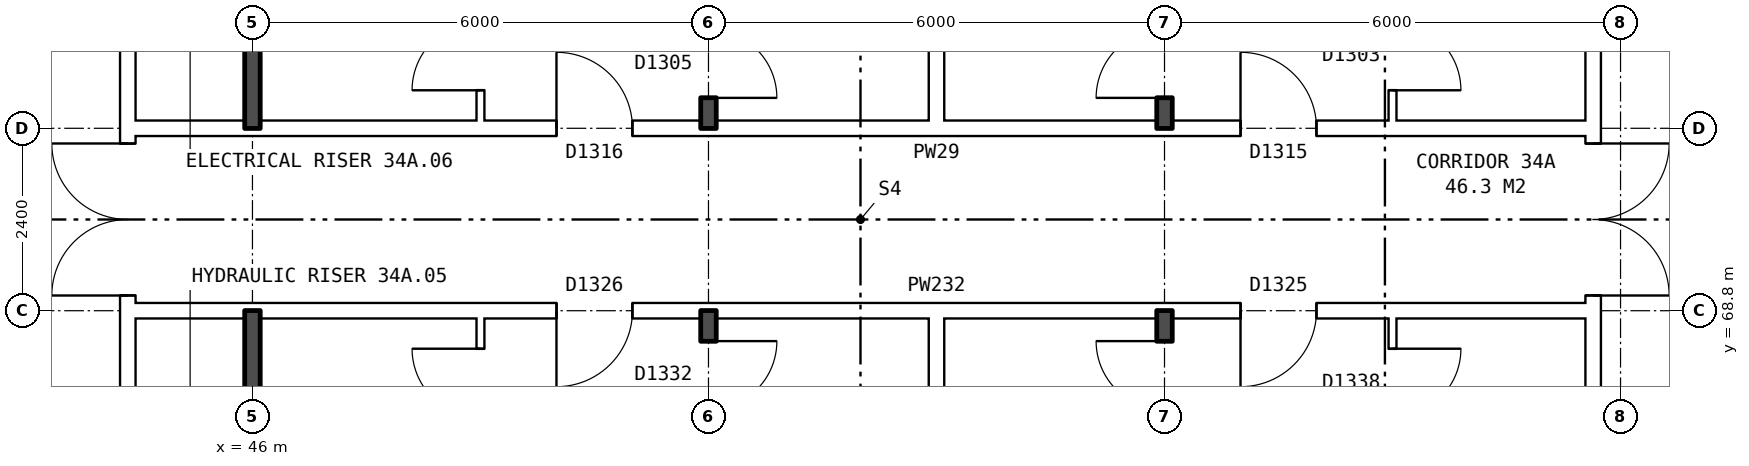
"""IFC4 building model, lengths in metres.
Left out: names, types, materials, properties, quantities, classifications, styles, units other than length and angle.
Written with IfcOpenShell. Run it as: python <this file> out.ifc"""

import sys

from ifc_helpers import new_model, si_unit, direction, frame, frame_2d, origin, place, context, subcontext, project, spatial, rectangle, extrude, element, fill, save


model = new_model("IFC4")
c1 = context("Model", 3, precision=1e-05, world=origin(), true_north=direction((0.0, 1.0)))
c2 = subcontext(c1, "Body", "Model", "MODEL_VIEW")
j1 = project(units=[si_unit("LENGTHUNIT", "METRE"), si_unit("PLANEANGLEUNIT", "RADIAN")], contexts=[c1])
p1 = place(None, origin())
s1 = spatial("IfcSite", under=j1, at=p1, CompositionType="ELEMENT")
p2 = place(p1, origin())
s2 = spatial("IfcBuilding", under=s1, at=p2, CompositionType="ELEMENT")
p3 = place(p2, frame((0.0, 0.0, 123.7)))
s3 = spatial("IfcBuildingStorey", under=s2, at=p3, CompositionType="ELEMENT", Elevation=123.7)
p4 = place(p3, frame((63.64, 63.9, 0.0), z_axis=(0.0, 0.0, 1.0), x_axis=(0.0, 1.0, 0.0)))
e1 = element("IfcWall", 1, at=p4, inside=s3, PredefinedType="PARTITIONING", context=c2, shape_type="SweptSolid", body=[
    extrude(rectangle(XDim=12.2, YDim=0.2, at=frame_2d((6.1, 0.0))), origin(), (0.0, 0.0, 1.0), 2.85),
])
p5 = place(p4, frame((5.1, 0.0, 0.0)))
e2 = element("IfcOpeningElement", 2, at=p5, cuts=e1, PredefinedType="OPENING", context=c2, shape_type="SweptSolid", body=[
    extrude(rectangle(XDim=2.0, YDim=2.1, at=frame_2d((1.0, 1.05))), frame((0.0, 0.11, 0.0), z_axis=(0.0, -1.0, 0.0), x_axis=(1.0, 0.0, 0.0)), (0.0, 0.0, 1.0), 0.22),
])
p6 = place(p3, frame((44.36, 63.9, 0.0), z_axis=(0.0, 0.0, 1.0), x_axis=(0.0, 1.0, 0.0)))
e3 = element("IfcWall", 3, at=p6, inside=s3, PredefinedType="PARTITIONING", context=c2, shape_type="SweptSolid", body=[
    extrude(rectangle(XDim=12.2, YDim=0.2, at=frame_2d((6.1, 0.0))), origin(), (0.0, 0.0, 1.0), 2.85),
])
p7 = place(p6, frame((5.1, 0.0, 0.0)))
e4 = element("IfcOpeningElement", 4, at=p7, cuts=e3, PredefinedType="OPENING", context=c2, shape_type="SweptSolid", body=[
    extrude(rectangle(XDim=2.0, YDim=2.1, at=frame_2d((1.0, 1.05))), frame((0.0, 0.11, 0.0), z_axis=(0.0, -1.0, 0.0), x_axis=(1.0, 0.0, 0.0)), (0.0, 0.0, 1.0), 0.22),
])
p8 = place(p3, frame((44.36, 68.8, 0.0), z_axis=(0.0, 0.0, 1.0), x_axis=(1.0, 0.0, 0.0)))
e5 = element("IfcWall", 5, at=p8, inside=s3, PredefinedType="PARTITIONING", context=c2, shape_type="SweptSolid", body=[
    extrude(rectangle(XDim=19.28, YDim=0.2, at=frame_2d((9.64, 0.0))), origin(), (0.0, 0.0, 1.0), 2.85),
])
p9 = place(p8, frame((14.64, 0.0, 0.0)))
e6 = element("IfcOpeningElement", 6, at=p9, cuts=e5, PredefinedType="OPENING", context=c2, shape_type="SweptSolid", body=[
    extrude(rectangle(XDim=1.0, YDim=2.1, at=frame_2d((0.5, 1.05))), frame((0.0, 0.11, 0.0), z_axis=(0.0, -1.0, 0.0), x_axis=(1.0, 0.0, 0.0)), (0.0, 0.0, 1.0), 0.22),
])
p10 = place(p8, frame((5.64, 0.0, 0.0)))
e7 = element("IfcOpeningElement", 7, at=p10, cuts=e5, PredefinedType="OPENING", context=c2, shape_type="SweptSolid", body=[
    extrude(rectangle(XDim=1.0, YDim=2.1, at=frame_2d((0.5, 1.05))), frame((0.0, 0.11, 0.0), z_axis=(0.0, -1.0, 0.0), x_axis=(1.0, 0.0, 0.0)), (0.0, 0.0, 1.0), 0.22),
])
p11 = place(p3, frame((44.36, 71.2, 0.0), z_axis=(0.0, 0.0, 1.0), x_axis=(1.0, 0.0, 0.0)))
e8 = element("IfcWall", 8, at=p11, inside=s3, PredefinedType="PARTITIONING", context=c2, shape_type="SweptSolid", body=[
    extrude(rectangle(XDim=19.28, YDim=0.2, at=frame_2d((9.64, 0.0))), origin(), (0.0, 0.0, 1.0), 2.85),
])
p12 = place(p11, frame((14.64, 0.0, 0.0)))
e9 = element("IfcOpeningElement", 9, at=p12, cuts=e8, PredefinedType="OPENING", context=c2, shape_type="SweptSolid", body=[
    extrude(rectangle(XDim=1.0, YDim=2.1, at=frame_2d((0.5, 1.05))), frame((0.0, 0.11, 0.0), z_axis=(0.0, -1.0, 0.0), x_axis=(1.0, 0.0, 0.0)), (0.0, 0.0, 1.0), 0.22),
])
p13 = place(p11, frame((5.64, 0.0, 0.0)))
e10 = element("IfcOpeningElement", 10, at=p13, cuts=e8, PredefinedType="OPENING", context=c2, shape_type="SweptSolid", body=[
    extrude(rectangle(XDim=1.0, YDim=2.1, at=frame_2d((0.5, 1.05))), frame((0.0, 0.11, 0.0), z_axis=(0.0, -1.0, 0.0), x_axis=(1.0, 0.0, 0.0)), (0.0, 0.0, 1.0), 0.22),
])
for number, where, z_axis, x_axis in (
    (11, (46.0, 63.8, 0.0), (0.0, 0.0, 1.0), (0.0, 1.0, 0.0)),
    (12, (46.0, 71.2, 0.0), (0.0, 0.0, 1.0), (0.0, 1.0, 0.0)),
):
    element("IfcWall", number, at=place(p3, frame(where, z_axis=z_axis, x_axis=x_axis)), inside=s3, PredefinedType="SOLIDWALL", context=c2, shape_type="SweptSolid", body=[
        extrude(rectangle(XDim=5.0, YDim=0.2, at=frame_2d((2.5, 0.0))), origin(), (0.0, 0.0, 1.0), 2.85),
    ])
p14 = place(p3, frame((49.0, 54.36, 0.0), z_axis=(0.0, 0.0, 1.0), x_axis=(0.0, 1.0, 0.0)))
e13 = element("IfcWall", 13, at=p14, inside=s3, PredefinedType="PARTITIONING", context=c2, shape_type="SweptSolid", body=[
    extrude(rectangle(XDim=14.34, YDim=0.1, at=frame_2d((7.17, 0.0))), origin(), (0.0, 0.0, 1.0), 2.85),
])
p15 = place(p14, frame((6.7, 0.0, 0.0)))
e14 = element("IfcOpeningElement", 14, at=p15, cuts=e13, PredefinedType="OPENING", context=c2, shape_type="SweptSolid", body=[
    extrude(rectangle(XDim=0.9, YDim=2.1, at=frame_2d((0.45, 1.05))), frame((0.0, 0.06, 0.0), z_axis=(0.0, -1.0, 0.0), x_axis=(1.0, 0.0, 0.0)), (0.0, 0.0, 1.0), 0.12),
])
p16 = place(p14, frame((13.04, 0.0, 0.0)))
e15 = element("IfcOpeningElement", 15, at=p16, cuts=e13, PredefinedType="OPENING", context=c2, shape_type="SweptSolid", body=[
    extrude(rectangle(XDim=0.9, YDim=2.1, at=frame_2d((0.45, 1.05))), frame((0.0, 0.06, 0.0), z_axis=(0.0, -1.0, 0.0), x_axis=(1.0, 0.0, 0.0)), (0.0, 0.0, 1.0), 0.12),
])
p17 = place(p3, frame((49.0, 71.3, 0.0), z_axis=(0.0, 0.0, 1.0), x_axis=(0.0, 1.0, 0.0)))
e16 = element("IfcWall", 16, at=p17, inside=s3, PredefinedType="PARTITIONING", context=c2, shape_type="SweptSolid", body=[
    extrude(rectangle(XDim=14.34, YDim=0.1, at=frame_2d((7.17, 0.0))), origin(), (0.0, 0.0, 1.0), 2.85),
])
p18 = place(p17, frame((6.74, 0.0, 0.0)))
e17 = element("IfcOpeningElement", 17, at=p18, cuts=e16, PredefinedType="OPENING", context=c2, shape_type="SweptSolid", body=[
    extrude(rectangle(XDim=0.9, YDim=2.1, at=frame_2d((0.45, 1.05))), frame((0.0, 0.06, 0.0), z_axis=(0.0, -1.0, 0.0), x_axis=(1.0, 0.0, 0.0)), (0.0, 0.0, 1.0), 0.12),
])
p19 = place(p17, frame((0.4, 0.0, 0.0)))
e18 = element("IfcOpeningElement", 18, at=p19, cuts=e16, PredefinedType="OPENING", context=c2, shape_type="SweptSolid", body=[
    extrude(rectangle(XDim=0.9, YDim=2.1, at=frame_2d((0.45, 1.05))), frame((0.0, 0.06, 0.0), z_axis=(0.0, -1.0, 0.0), x_axis=(1.0, 0.0, 0.0)), (0.0, 0.0, 1.0), 0.12),
])
p20 = place(p3, frame((52.0, 54.36, 0.0), z_axis=(0.0, 0.0, 1.0), x_axis=(0.0, 1.0, 0.0)))
e19 = element("IfcWall", 19, at=p20, inside=s3, PredefinedType="SOLIDWALL", context=c2, shape_type="SweptSolid", body=[
    extrude(rectangle(XDim=14.44, YDim=0.2, at=frame_2d((7.22, 0.0))), origin(), (0.0, 0.0, 1.0), 2.85),
])
p21 = place(p20, frame((6.7, 0.0, 0.0)))
e20 = element("IfcOpeningElement", 20, at=p21, cuts=e19, PredefinedType="OPENING", context=c2, shape_type="SweptSolid", body=[
    extrude(rectangle(XDim=0.9, YDim=2.1, at=frame_2d((0.45, 1.05))), frame((0.0, 0.11, 0.0), z_axis=(0.0, -1.0, 0.0), x_axis=(1.0, 0.0, 0.0)), (0.0, 0.0, 1.0), 0.22),
])
p22 = place(p20, frame((13.14, 0.0, 0.0)))
e21 = element("IfcOpeningElement", 21, at=p22, cuts=e19, PredefinedType="OPENING", context=c2, shape_type="SweptSolid", body=[
    extrude(rectangle(XDim=0.9, YDim=2.1, at=frame_2d((0.45, 1.05))), frame((0.0, 0.11, 0.0), z_axis=(0.0, -1.0, 0.0), x_axis=(1.0, 0.0, 0.0)), (0.0, 0.0, 1.0), 0.22),
])
p23 = place(p3, frame((52.0, 71.2, 0.0), z_axis=(0.0, 0.0, 1.0), x_axis=(0.0, 1.0, 0.0)))
e22 = element("IfcWall", 22, at=p23, inside=s3, PredefinedType="SOLIDWALL", context=c2, shape_type="SweptSolid", body=[
    extrude(rectangle(XDim=14.44, YDim=0.2, at=frame_2d((7.22, 0.0))), origin(), (0.0, 0.0, 1.0), 2.85),
])
p24 = place(p23, frame((6.84, 0.0, 0.0)))
e23 = element("IfcOpeningElement", 23, at=p24, cuts=e22, PredefinedType="OPENING", context=c2, shape_type="SweptSolid", body=[
    extrude(rectangle(XDim=0.9, YDim=2.1, at=frame_2d((0.45, 1.05))), frame((0.0, 0.11, 0.0), z_axis=(0.0, -1.0, 0.0), x_axis=(1.0, 0.0, 0.0)), (0.0, 0.0, 1.0), 0.22),
])
p25 = place(p23, frame((0.4, 0.0, 0.0)))
e24 = element("IfcOpeningElement", 24, at=p25, cuts=e22, PredefinedType="OPENING", context=c2, shape_type="SweptSolid", body=[
    extrude(rectangle(XDim=0.9, YDim=2.1, at=frame_2d((0.45, 1.05))), frame((0.0, 0.11, 0.0), z_axis=(0.0, -1.0, 0.0), x_axis=(1.0, 0.0, 0.0)), (0.0, 0.0, 1.0), 0.22),
])
for number, where, z_axis, x_axis in (
    (25, (55.0, 54.36, 0.0), (0.0, 0.0, 1.0), (0.0, 1.0, 0.0)),
    (26, (55.0, 71.3, 0.0), (0.0, 0.0, 1.0), (0.0, 1.0, 0.0)),
):
    element("IfcWall", number, at=place(p3, frame(where, z_axis=z_axis, x_axis=x_axis)), inside=s3, PredefinedType="PARTITIONING", context=c2, shape_type="SweptSolid", body=[
        extrude(rectangle(XDim=14.34, YDim=0.2, at=frame_2d((7.17, 0.0))), origin(), (0.0, 0.0, 1.0), 2.85),
    ])
p26 = place(p3, frame((58.0, 54.36, 0.0), z_axis=(0.0, 0.0, 1.0), x_axis=(0.0, 1.0, 0.0)))
e27 = element("IfcWall", 27, at=p26, inside=s3, PredefinedType="SOLIDWALL", context=c2, shape_type="SweptSolid", body=[
    extrude(rectangle(XDim=14.44, YDim=0.2, at=frame_2d((7.22, 0.0))), origin(), (0.0, 0.0, 1.0), 2.85),
])
p27 = place(p26, frame((4.2, 0.0, 0.0)))
e28 = element("IfcOpeningElement", 28, at=p27, cuts=e27, PredefinedType="OPENING", context=c2, shape_type="SweptSolid", body=[
    extrude(rectangle(XDim=0.9, YDim=2.1, at=frame_2d((0.45, 1.05))), frame((0.0, 0.11, 0.0), z_axis=(0.0, -1.0, 0.0), x_axis=(1.0, 0.0, 0.0)), (0.0, 0.0, 1.0), 0.22),
])
p28 = place(p26, frame((13.14, 0.0, 0.0)))
e29 = element("IfcOpeningElement", 29, at=p28, cuts=e27, PredefinedType="OPENING", context=c2, shape_type="SweptSolid", body=[
    extrude(rectangle(XDim=0.9, YDim=2.1, at=frame_2d((0.45, 1.05))), frame((0.0, 0.11, 0.0), z_axis=(0.0, -1.0, 0.0), x_axis=(1.0, 0.0, 0.0)), (0.0, 0.0, 1.0), 0.22),
])
p29 = place(p3, frame((58.0, 71.2, 0.0), z_axis=(0.0, 0.0, 1.0), x_axis=(0.0, 1.0, 0.0)))
e30 = element("IfcWall", 30, at=p29, inside=s3, PredefinedType="SOLIDWALL", context=c2, shape_type="SweptSolid", body=[
    extrude(rectangle(XDim=14.44, YDim=0.2, at=frame_2d((7.22, 0.0))), origin(), (0.0, 0.0, 1.0), 2.85),
])
p30 = place(p29, frame((9.34, 0.0, 0.0)))
e31 = element("IfcOpeningElement", 31, at=p30, cuts=e30, PredefinedType="OPENING", context=c2, shape_type="SweptSolid", body=[
    extrude(rectangle(XDim=0.9, YDim=2.1, at=frame_2d((0.45, 1.05))), frame((0.0, 0.11, 0.0), z_axis=(0.0, -1.0, 0.0), x_axis=(1.0, 0.0, 0.0)), (0.0, 0.0, 1.0), 0.22),
])
p31 = place(p29, frame((0.4, 0.0, 0.0)))
e32 = element("IfcOpeningElement", 32, at=p31, cuts=e30, PredefinedType="OPENING", context=c2, shape_type="SweptSolid", body=[
    extrude(rectangle(XDim=0.9, YDim=2.1, at=frame_2d((0.45, 1.05))), frame((0.0, 0.11, 0.0), z_axis=(0.0, -1.0, 0.0), x_axis=(1.0, 0.0, 0.0)), (0.0, 0.0, 1.0), 0.22),
])
p32 = place(p3, frame((61.0, 54.36, 0.0), z_axis=(0.0, 0.0, 1.0), x_axis=(0.0, 1.0, 0.0)))
e33 = element("IfcWall", 33, at=p32, inside=s3, PredefinedType="PARTITIONING", context=c2, shape_type="SweptSolid", body=[
    extrude(rectangle(XDim=14.34, YDim=0.1, at=frame_2d((7.17, 0.0))), origin(), (0.0, 0.0, 1.0), 2.85),
])
p33 = place(p32, frame((4.2, 0.0, 0.0)))
e34 = element("IfcOpeningElement", 34, at=p33, cuts=e33, PredefinedType="OPENING", context=c2, shape_type="SweptSolid", body=[
    extrude(rectangle(XDim=0.9, YDim=2.1, at=frame_2d((0.45, 1.05))), frame((0.0, 0.06, 0.0), z_axis=(0.0, -1.0, 0.0), x_axis=(1.0, 0.0, 0.0)), (0.0, 0.0, 1.0), 0.12),
])
p34 = place(p32, frame((13.04, 0.0, 0.0)))
e35 = element("IfcOpeningElement", 35, at=p34, cuts=e33, PredefinedType="OPENING", context=c2, shape_type="SweptSolid", body=[
    extrude(rectangle(XDim=0.9, YDim=2.1, at=frame_2d((0.45, 1.05))), frame((0.0, 0.06, 0.0), z_axis=(0.0, -1.0, 0.0), x_axis=(1.0, 0.0, 0.0)), (0.0, 0.0, 1.0), 0.12),
])
p35 = place(p3, frame((61.0, 71.3, 0.0), z_axis=(0.0, 0.0, 1.0), x_axis=(0.0, 1.0, 0.0)))
e36 = element("IfcWall", 36, at=p35, inside=s3, PredefinedType="PARTITIONING", context=c2, shape_type="SweptSolid", body=[
    extrude(rectangle(XDim=14.34, YDim=0.1, at=frame_2d((7.17, 0.0))), origin(), (0.0, 0.0, 1.0), 2.85),
])
p36 = place(p35, frame((9.24, 0.0, 0.0)))
e37 = element("IfcOpeningElement", 37, at=p36, cuts=e36, PredefinedType="OPENING", context=c2, shape_type="SweptSolid", body=[
    extrude(rectangle(XDim=0.9, YDim=2.1, at=frame_2d((0.45, 1.05))), frame((0.0, 0.06, 0.0), z_axis=(0.0, -1.0, 0.0), x_axis=(1.0, 0.0, 0.0)), (0.0, 0.0, 1.0), 0.12),
])
p37 = place(p35, frame((0.4, 0.0, 0.0)))
e38 = element("IfcOpeningElement", 38, at=p37, cuts=e36, PredefinedType="OPENING", context=c2, shape_type="SweptSolid", body=[
    extrude(rectangle(XDim=0.9, YDim=2.1, at=frame_2d((0.45, 1.05))), frame((0.0, 0.06, 0.0), z_axis=(0.0, -1.0, 0.0), x_axis=(1.0, 0.0, 0.0)), (0.0, 0.0, 1.0), 0.12),
])
p38 = place(p5, frame((2.0, 0.0, 0.0), z_axis=(0.0, 0.0, 1.0), x_axis=(-1.0, 0.0, 0.0)))
e39 = element("IfcDoor", 39, at=p38, inside=s3, OperationType="DOUBLE_DOOR_SINGLE_SWING", PredefinedType="DOOR", context=c2, shape_type="SweptSolid", body=[
    extrude(rectangle(XDim=2.0, YDim=2.1, at=frame_2d((1.0, 1.05))), frame((0.0, 0.025, 0.0), z_axis=(0.0, -1.0, 0.0), x_axis=(1.0, 0.0, 0.0)), (0.0, 0.0, 1.0), 0.05),
])
fill(e2, e39)
p39 = place(p7, origin())
e40 = element("IfcDoor", 40, at=p39, inside=s3, OperationType="DOUBLE_DOOR_SINGLE_SWING", PredefinedType="DOOR", context=c2, shape_type="SweptSolid", body=[
    extrude(rectangle(XDim=2.0, YDim=2.1, at=frame_2d((1.0, 1.05))), frame((0.0, 0.025, 0.0), z_axis=(0.0, -1.0, 0.0), x_axis=(1.0, 0.0, 0.0)), (0.0, 0.0, 1.0), 0.05),
])
fill(e4, e40)
p40 = place(p9, frame((1.0, 0.0, 0.0), z_axis=(0.0, 0.0, 1.0), x_axis=(-1.0, 0.0, 0.0)))
e41 = element("IfcDoor", 41, at=p40, inside=s3, OperationType="SINGLE_SWING_RIGHT", PredefinedType="DOOR", context=c2, shape_type="SweptSolid", body=[
    extrude(rectangle(XDim=1.0, YDim=2.1, at=frame_2d((0.5, 1.05))), frame((0.0, 0.025, 0.0), z_axis=(0.0, -1.0, 0.0), x_axis=(1.0, 0.0, 0.0)), (0.0, 0.0, 1.0), 0.05),
])
fill(e6, e41)
p41 = place(p34, frame((0.9, 0.0, 0.0), z_axis=(0.0, 0.0, 1.0), x_axis=(-1.0, 0.0, 0.0)))
e42 = element("IfcDoor", 42, at=p41, inside=s3, OperationType="SINGLE_SWING_LEFT", PredefinedType="DOOR", context=c2, shape_type="SweptSolid", body=[
    extrude(rectangle(XDim=0.9, YDim=2.1, at=frame_2d((0.45, 1.05))), frame((0.0, 0.025, 0.0), z_axis=(0.0, -1.0, 0.0), x_axis=(1.0, 0.0, 0.0)), (0.0, 0.0, 1.0), 0.05),
])
fill(e35, e42)
p42 = place(p28, origin())
e43 = element("IfcDoor", 43, at=p42, inside=s3, OperationType="SINGLE_SWING_RIGHT", PredefinedType="DOOR", context=c2, shape_type="SweptSolid", body=[
    extrude(rectangle(XDim=0.9, YDim=2.1, at=frame_2d((0.45, 1.05))), frame((0.0, 0.025, 0.0), z_axis=(0.0, -1.0, 0.0), x_axis=(1.0, 0.0, 0.0)), (0.0, 0.0, 1.0), 0.05),
])
fill(e29, e43)
p43 = place(p10, frame((1.0, 0.0, 0.0), z_axis=(0.0, 0.0, 1.0), x_axis=(-1.0, 0.0, 0.0)))
e44 = element("IfcDoor", 44, at=p43, inside=s3, OperationType="SINGLE_SWING_RIGHT", PredefinedType="DOOR", context=c2, shape_type="SweptSolid", body=[
    extrude(rectangle(XDim=1.0, YDim=2.1, at=frame_2d((0.5, 1.05))), frame((0.0, 0.025, 0.0), z_axis=(0.0, -1.0, 0.0), x_axis=(1.0, 0.0, 0.0)), (0.0, 0.0, 1.0), 0.05),
])
fill(e7, e44)
p44 = place(p22, frame((0.9, 0.0, 0.0), z_axis=(0.0, 0.0, 1.0), x_axis=(-1.0, 0.0, 0.0)))
e45 = element("IfcDoor", 45, at=p44, inside=s3, OperationType="SINGLE_SWING_LEFT", PredefinedType="DOOR", context=c2, shape_type="SweptSolid", body=[
    extrude(rectangle(XDim=0.9, YDim=2.1, at=frame_2d((0.45, 1.05))), frame((0.0, 0.025, 0.0), z_axis=(0.0, -1.0, 0.0), x_axis=(1.0, 0.0, 0.0)), (0.0, 0.0, 1.0), 0.05),
])
fill(e21, e45)
p45 = place(p16, origin())
e46 = element("IfcDoor", 46, at=p45, inside=s3, OperationType="SINGLE_SWING_RIGHT", PredefinedType="DOOR", context=c2, shape_type="SweptSolid", body=[
    extrude(rectangle(XDim=0.9, YDim=2.1, at=frame_2d((0.45, 1.05))), frame((0.0, 0.025, 0.0), z_axis=(0.0, -1.0, 0.0), x_axis=(1.0, 0.0, 0.0)), (0.0, 0.0, 1.0), 0.05),
])
fill(e15, e46)
p46 = place(p12, origin())
e47 = element("IfcDoor", 47, at=p46, inside=s3, OperationType="SINGLE_SWING_LEFT", PredefinedType="DOOR", context=c2, shape_type="SweptSolid", body=[
    extrude(rectangle(XDim=1.0, YDim=2.1, at=frame_2d((0.5, 1.05))), frame((0.0, 0.025, 0.0), z_axis=(0.0, -1.0, 0.0), x_axis=(1.0, 0.0, 0.0)), (0.0, 0.0, 1.0), 0.05),
])
fill(e9, e47)
p47 = place(p37, frame((0.9, 0.0, 0.0), z_axis=(0.0, 0.0, 1.0), x_axis=(-1.0, 0.0, 0.0)))
e48 = element("IfcDoor", 48, at=p47, inside=s3, OperationType="SINGLE_SWING_RIGHT", PredefinedType="DOOR", context=c2, shape_type="SweptSolid", body=[
    extrude(rectangle(XDim=0.9, YDim=2.1, at=frame_2d((0.45, 1.05))), frame((0.0, 0.025, 0.0), z_axis=(0.0, -1.0, 0.0), x_axis=(1.0, 0.0, 0.0)), (0.0, 0.0, 1.0), 0.05),
])
fill(e38, e48)
p48 = place(p31, origin())
e49 = element("IfcDoor", 49, at=p48, inside=s3, OperationType="SINGLE_SWING_LEFT", PredefinedType="DOOR", context=c2, shape_type="SweptSolid", body=[
    extrude(rectangle(XDim=0.9, YDim=2.1, at=frame_2d((0.45, 1.05))), frame((0.0, 0.025, 0.0), z_axis=(0.0, -1.0, 0.0), x_axis=(1.0, 0.0, 0.0)), (0.0, 0.0, 1.0), 0.05),
])
fill(e32, e49)
p49 = place(p13, origin())
e50 = element("IfcDoor", 50, at=p49, inside=s3, OperationType="SINGLE_SWING_LEFT", PredefinedType="DOOR", context=c2, shape_type="SweptSolid", body=[
    extrude(rectangle(XDim=1.0, YDim=2.1, at=frame_2d((0.5, 1.05))), frame((0.0, 0.025, 0.0), z_axis=(0.0, -1.0, 0.0), x_axis=(1.0, 0.0, 0.0)), (0.0, 0.0, 1.0), 0.05),
])
fill(e10, e50)
p50 = place(p25, frame((0.9, 0.0, 0.0), z_axis=(0.0, 0.0, 1.0), x_axis=(-1.0, 0.0, 0.0)))
e51 = element("IfcDoor", 51, at=p50, inside=s3, OperationType="SINGLE_SWING_RIGHT", PredefinedType="DOOR", context=c2, shape_type="SweptSolid", body=[
    extrude(rectangle(XDim=0.9, YDim=2.1, at=frame_2d((0.45, 1.05))), frame((0.0, 0.025, 0.0), z_axis=(0.0, -1.0, 0.0), x_axis=(1.0, 0.0, 0.0)), (0.0, 0.0, 1.0), 0.05),
])
fill(e24, e51)
p51 = place(p19, origin())
e52 = element("IfcDoor", 52, at=p51, inside=s3, OperationType="SINGLE_SWING_LEFT", PredefinedType="DOOR", context=c2, shape_type="SweptSolid", body=[
    extrude(rectangle(XDim=0.9, YDim=2.1, at=frame_2d((0.45, 1.05))), frame((0.0, 0.025, 0.0), z_axis=(0.0, -1.0, 0.0), x_axis=(1.0, 0.0, 0.0)), (0.0, 0.0, 1.0), 0.05),
])
fill(e18, e52)
save(model, sys.argv[1])
